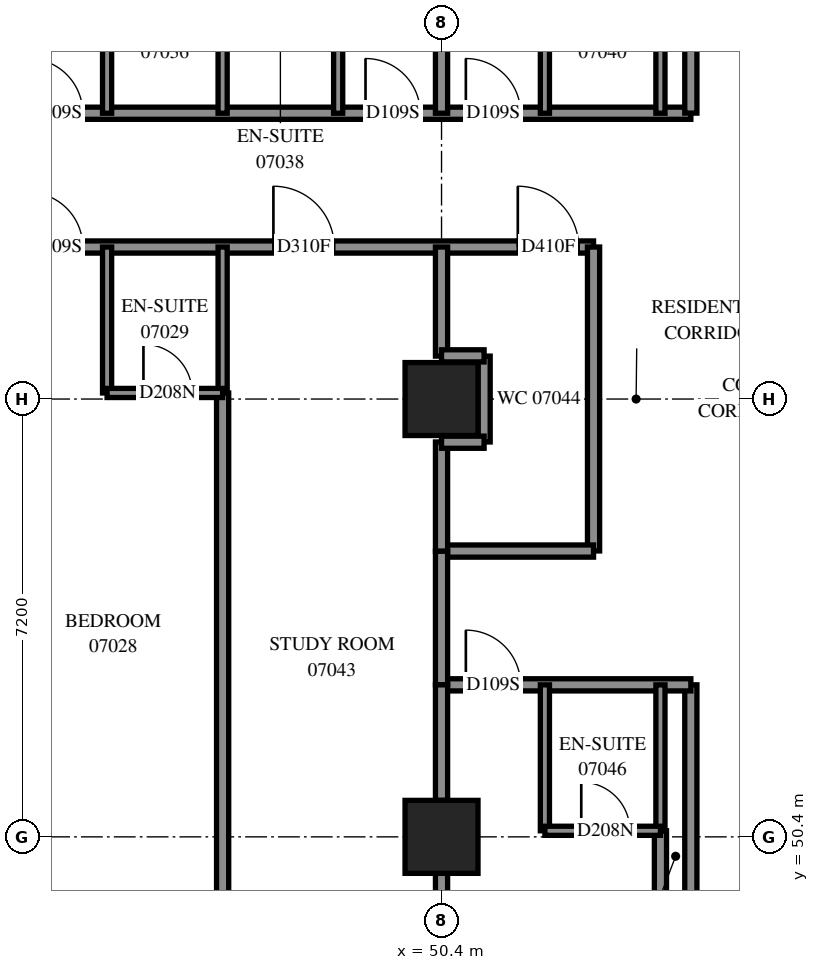
"""IFC4 building model, lengths in metres.
Left out: names, types, materials, properties, quantities, classifications, styles, units other than length and angle.
Written with IfcOpenShell. Run it as: python <this file> out.ifc"""

import sys

from ifc_helpers import new_model, si_unit, direction, frame, frame_2d, origin, origin_2d, place, context, subcontext, project, spatial, rectangle, extrude, element, fill, save


model = new_model("IFC4")
c1 = context("Model", 3, precision=1e-05, world=origin(), true_north=direction((0.0, 1.0)))
c2 = subcontext(c1, "Body", "Model", "MODEL_VIEW")
j1 = project(units=[si_unit("LENGTHUNIT", "METRE"), si_unit("PLANEANGLEUNIT", "RADIAN")], contexts=[c1])
p1 = place(None, origin())
s1 = spatial("IfcSite", under=j1, at=p1, CompositionType="ELEMENT")
p2 = place(p1, origin())
s2 = spatial("IfcBuilding", under=s1, at=p2, CompositionType="ELEMENT")
p3 = place(p2, frame((0.0, 0.0, 30.4)))
s3 = spatial("IfcBuildingStorey", under=s2, at=p3, CompositionType="ELEMENT", Elevation=30.4)
for number, where, z_axis, x_axis in (
    (1, (50.4, 50.4, 0.0), (0.0, 0.0, 1.0), (1.0, 0.0, 0.0)),
    (2, (50.4, 57.6, 0.0), (0.0, 0.0, 1.0), (1.0, 0.0, 0.0)),
):
    element("IfcColumn", number, at=place(p3, frame(where, z_axis=z_axis, x_axis=x_axis)), inside=s3, PredefinedType="COLUMN", context=c2, shape_type="SweptSolid", body=[
        extrude(rectangle(XDim=1.2, YDim=1.2, at=origin_2d()), origin(), (0.0, 0.0, 1.0), 3.1),
    ])
p4 = place(p3, frame((28.8, 60.1, 0.0), z_axis=(0.0, 0.0, 1.0), x_axis=(1.0, 0.0, 0.0)))
e3 = element("IfcWall", 3, at=p4, inside=s3, PredefinedType="PARTITIONING", context=c2, shape_type="SweptSolid", body=[
    extrude(rectangle(XDim=24.1, YDim=0.2, at=frame_2d((12.05, 0.0))), origin(), (0.0, 0.0, 1.0), 3.1),
])
p5 = place(p4, frame((4.125, 0.0, 0.0)))
e4 = element("IfcOpeningElement", 4, at=p5, cuts=e3, PredefinedType="OPENING", context=c2, shape_type="SweptSolid", body=[
    extrude(rectangle(XDim=1.0, YDim=2.1, at=frame_2d((0.5, 1.05))), frame((0.0, 0.11, 0.0), z_axis=(0.0, -1.0, 0.0), x_axis=(1.0, 0.0, 0.0)), (0.0, 0.0, 1.0), 0.22),
])
p6 = place(p4, frame((11.62, 0.0, 0.0)))
e5 = element("IfcOpeningElement", 5, at=p6, cuts=e3, PredefinedType="OPENING", context=c2, shape_type="SweptSolid", body=[
    extrude(rectangle(XDim=0.9, YDim=2.1, at=frame_2d((0.45, 1.05))), frame((0.0, 0.11, 0.0), z_axis=(0.0, -1.0, 0.0), x_axis=(1.0, 0.0, 0.0)), (0.0, 0.0, 1.0), 0.22),
])
p7 = place(p4, frame((14.8, 0.0, 0.0)))
e6 = element("IfcOpeningElement", 6, at=p7, cuts=e3, PredefinedType="OPENING", context=c2, shape_type="SweptSolid", body=[
    extrude(rectangle(XDim=0.9, YDim=2.1, at=frame_2d((0.45, 1.05))), frame((0.0, 0.11, 0.0), z_axis=(0.0, -1.0, 0.0), x_axis=(1.0, 0.0, 0.0)), (0.0, 0.0, 1.0), 0.22),
])
p8 = place(p4, frame((18.835, 0.0, 0.0)))
e7 = element("IfcOpeningElement", 7, at=p8, cuts=e3, PredefinedType="OPENING", context=c2, shape_type="SweptSolid", body=[
    extrude(rectangle(XDim=1.0, YDim=2.1, at=frame_2d((0.5, 1.05))), frame((0.0, 0.11, 0.0), z_axis=(0.0, -1.0, 0.0), x_axis=(1.0, 0.0, 0.0)), (0.0, 0.0, 1.0), 0.22),
])
p9 = place(p4, frame((22.854, 0.0, 0.0)))
e8 = element("IfcOpeningElement", 8, at=p9, cuts=e3, PredefinedType="OPENING", context=c2, shape_type="SweptSolid", body=[
    extrude(rectangle(XDim=1.0, YDim=2.1, at=frame_2d((0.5, 1.05))), frame((0.0, 0.11, 0.0), z_axis=(0.0, -1.0, 0.0), x_axis=(1.0, 0.0, 0.0)), (0.0, 0.0, 1.0), 0.22),
])
p10 = place(p3, frame((33.502, 62.3, 0.0), z_axis=(0.0, 0.0, 1.0), x_axis=(1.0, 0.0, 0.0)))
e9 = element("IfcWall", 9, at=p10, inside=s3, PredefinedType="PARTITIONING", context=c2, shape_type="SweptSolid", body=[
    extrude(rectangle(XDim=20.998, YDim=0.2, at=frame_2d((10.499, 0.0))), origin(), (0.0, 0.0, 1.0), 3.1),
])
p11 = place(p10, frame((2.898, 0.0, 0.0)))
e10 = element("IfcOpeningElement", 10, at=p11, cuts=e9, PredefinedType="OPENING", context=c2, shape_type="SweptSolid", body=[
    extrude(rectangle(XDim=0.9, YDim=2.1, at=frame_2d((0.45, 1.05))), frame((0.0, 0.11, 0.0), z_axis=(0.0, -1.0, 0.0), x_axis=(1.0, 0.0, 0.0)), (0.0, 0.0, 1.0), 0.22),
])
p12 = place(p10, frame((8.448, 0.0, 0.0)))
e11 = element("IfcOpeningElement", 11, at=p12, cuts=e9, PredefinedType="OPENING", context=c2, shape_type="SweptSolid", body=[
    extrude(rectangle(XDim=0.9, YDim=2.1, at=frame_2d((0.45, 1.05))), frame((0.0, 0.11, 0.0), z_axis=(0.0, -1.0, 0.0), x_axis=(1.0, 0.0, 0.0)), (0.0, 0.0, 1.0), 0.22),
])
p13 = place(p10, frame((10.098, 0.0, 0.0)))
e12 = element("IfcOpeningElement", 12, at=p13, cuts=e9, PredefinedType="OPENING", context=c2, shape_type="SweptSolid", body=[
    extrude(rectangle(XDim=0.9, YDim=2.1, at=frame_2d((0.45, 1.05))), frame((0.0, 0.11, 0.0), z_axis=(0.0, -1.0, 0.0), x_axis=(1.0, 0.0, 0.0)), (0.0, 0.0, 1.0), 0.22),
])
p14 = place(p10, frame((15.648, 0.0, 0.0)))
e13 = element("IfcOpeningElement", 13, at=p14, cuts=e9, PredefinedType="OPENING", context=c2, shape_type="SweptSolid", body=[
    extrude(rectangle(XDim=0.9, YDim=2.1, at=frame_2d((0.45, 1.05))), frame((0.0, 0.11, 0.0), z_axis=(0.0, -1.0, 0.0), x_axis=(1.0, 0.0, 0.0)), (0.0, 0.0, 1.0), 0.22),
])
p15 = place(p10, frame((17.298, 0.0, 0.0)))
e14 = element("IfcOpeningElement", 14, at=p15, cuts=e9, PredefinedType="OPENING", context=c2, shape_type="SweptSolid", body=[
    extrude(rectangle(XDim=0.9, YDim=2.1, at=frame_2d((0.45, 1.05))), frame((0.0, 0.11, 0.0), z_axis=(0.0, -1.0, 0.0), x_axis=(1.0, 0.0, 0.0)), (0.0, 0.0, 1.0), 0.22),
])
p16 = place(p3, frame((46.8, 48.82, 0.0), z_axis=(0.0, 0.0, 1.0), x_axis=(0.0, 1.0, 0.0)))
e15 = element("IfcWall", 15, at=p16, inside=s3, PredefinedType="PARTITIONING", context=c2, shape_type="SweptSolid", body=[
    extrude(rectangle(XDim=8.88, YDim=0.2, at=frame_2d((4.44, 0.0))), origin(), (0.0, 0.0, 1.0), 3.1),
])
p17 = place(p3, frame((54.0, 42.42, 0.0), z_axis=(0.0, 0.0, 1.0), x_axis=(0.0, 1.0, 0.0)))
e16 = element("IfcWall", 16, at=p17, inside=s3, PredefinedType="PARTITIONING", context=c2, shape_type="SweptSolid", body=[
    extrude(rectangle(XDim=8.08, YDim=0.2, at=frame_2d((4.04, 0.0))), origin(), (0.0, 0.0, 1.0), 3.1),
])
p18 = place(p3, frame((50.4, 43.8, 0.0), z_axis=(0.0, 0.0, 1.0), x_axis=(0.0, 1.0, 0.0)))
e17 = element("IfcWall", 17, at=p18, inside=s3, PredefinedType="PARTITIONING", context=c2, shape_type="SweptSolid", body=[
    extrude(rectangle(XDim=6.0, YDim=0.2, at=frame_2d((3.0, 0.0))), origin(), (0.0, 0.0, 1.0), 2.6),
])
p19 = place(p3, frame((54.5, 47.3, 0.0), z_axis=(0.0, 0.0, 1.0), x_axis=(0.0, 1.0, 0.0)))
e18 = element("IfcWall", 18, at=p19, inside=s3, PredefinedType="PARTITIONING", context=c2, shape_type="SweptSolid", body=[
    extrude(rectangle(XDim=5.6, YDim=0.2, at=frame_2d((2.8, 0.0))), origin(), (0.0, 0.0, 1.0), 3.1),
])
p20 = place(p3, frame((54.5, 62.302, 0.0), z_axis=(0.0, 0.0, 1.0), x_axis=(0.0, 1.0, 0.0)))
e19 = element("IfcWall", 19, at=p20, inside=s3, PredefinedType="PARTITIONING", context=c2, shape_type="SweptSolid", body=[
    extrude(rectangle(XDim=5.598, YDim=0.2, at=frame_2d((2.799, 0.0))), origin(), (0.0, 0.0, 1.0), 3.1),
])
p21 = place(p3, frame((52.9, 55.102, 0.0), z_axis=(0.0, 0.0, 1.0), x_axis=(0.0, 1.0, 0.0)))
e20 = element("IfcWall", 20, at=p21, inside=s3, PredefinedType="PARTITIONING", context=c2, shape_type="SweptSolid", body=[
    extrude(rectangle(XDim=4.998, YDim=0.2, at=frame_2d((2.499, 0.0))), origin(), (0.0, 0.0, 1.0), 3.1),
])
p22 = place(p3, frame((50.4, 52.9, 0.0), z_axis=(0.0, 0.0, 1.0), x_axis=(1.0, 0.0, 0.0)))
e21 = element("IfcWall", 21, at=p22, inside=s3, PredefinedType="PARTITIONING", context=c2, shape_type="SweptSolid", body=[
    extrude(rectangle(XDim=4.1, YDim=0.2, at=frame_2d((2.05, 0.0))), origin(), (0.0, 0.0, 1.0), 3.1),
])
p23 = place(p22, frame((0.4, 0.0, 0.0)))
e22 = element("IfcOpeningElement", 22, at=p23, cuts=e21, PredefinedType="OPENING", context=c2, shape_type="SweptSolid", body=[
    extrude(rectangle(XDim=0.9, YDim=2.1, at=frame_2d((0.45, 1.05))), frame((0.0, 0.11, 0.0), z_axis=(0.0, -1.0, 0.0), x_axis=(1.0, 0.0, 0.0)), (0.0, 0.0, 1.0), 0.22),
])
p24 = place(p3, frame((50.4, 55.1, 0.0), z_axis=(0.0, 0.0, 1.0), x_axis=(1.0, 0.0, 0.0)))
e23 = element("IfcWall", 23, at=p24, inside=s3, PredefinedType="PARTITIONING", context=c2, shape_type="SweptSolid", body=[
    extrude(rectangle(XDim=2.5, YDim=0.2, at=frame_2d((1.25, 0.0))), origin(), (0.0, 0.0, 1.0), 3.1),
])
for number, where, z_axis, x_axis in (
    (24, (44.9, 62.3, 0.0), (0.0, 0.0, 1.0), (0.0, 1.0, 0.0)),
    (25, (46.8, 62.3, 0.0), (0.0, 0.0, 1.0), (0.0, 1.0, 0.0)),
    (26, (48.7, 62.3, 0.0), (0.0, 0.0, 1.0), (0.0, 1.0, 0.0)),
    (27, (52.1, 62.3, 0.0), (0.0, 0.0, 1.0), (0.0, 1.0, 0.0)),
    (28, (54.0, 62.3, 0.0), (0.0, 0.0, 1.0), (0.0, 1.0, 0.0)),
    (29, (44.9, 57.7, 0.0), (0.0, 0.0, 1.0), (0.0, 1.0, 0.0)),
    (30, (46.8, 57.7, 0.0), (0.0, 0.0, 1.0), (0.0, 1.0, 0.0)),
    (31, (52.1, 50.5, 0.0), (0.0, 0.0, 1.0), (0.0, 1.0, 0.0)),
    (32, (54.0, 50.5, 0.0), (0.0, 0.0, 1.0), (0.0, 1.0, 0.0)),
):
    element("IfcWall", number, at=place(p3, frame(where, z_axis=z_axis, x_axis=x_axis)), inside=s3, PredefinedType="PARTITIONING", context=c2, shape_type="SweptSolid", body=[
        extrude(rectangle(XDim=2.4, YDim=0.15, at=frame_2d((1.2, 0.0))), origin(), (0.0, 0.0, 1.0), 3.1),
    ])
p25 = place(p3, frame((50.4, 52.9, 0.0), z_axis=(0.0, 0.0, 1.0), x_axis=(0.0, 1.0, 0.0)))
e33 = element("IfcWall", 33, at=p25, inside=s3, PredefinedType="PARTITIONING", context=c2, shape_type="SweptSolid", body=[
    extrude(rectangle(XDim=2.2, YDim=0.2, at=frame_2d((1.1, 0.0))), origin(), (0.0, 0.0, 1.0), 3.1),
])
p26 = place(p3, frame((50.4, 62.3, 0.0), z_axis=(0.0, 0.0, 1.0), x_axis=(0.0, 1.0, 0.0)))
e34 = element("IfcWall", 34, at=p26, inside=s3, PredefinedType="PARTITIONING", context=c2, shape_type="SweptSolid", body=[
    extrude(rectangle(XDim=1.9, YDim=0.2, at=frame_2d((0.95, 0.0))), origin(), (0.0, 0.0, 1.0), 3.1),
])
p27 = place(p3, frame((44.9, 57.7, 0.0), z_axis=(0.0, 0.0, 1.0), x_axis=(1.0, 0.0, 0.0)))
e35 = element("IfcWall", 35, at=p27, inside=s3, PredefinedType="PARTITIONING", context=c2, shape_type="SweptSolid", body=[
    extrude(rectangle(XDim=1.9, YDim=0.15, at=frame_2d((0.95, 0.0))), origin(), (0.0, 0.0, 1.0), 3.1),
])
p28 = place(p27, frame((0.598, 0.0, 0.0)))
e36 = element("IfcOpeningElement", 36, at=p28, cuts=e35, PredefinedType="OPENING", context=c2, shape_type="SweptSolid", body=[
    extrude(rectangle(XDim=0.8, YDim=2.1, at=frame_2d((0.4, 1.05))), frame((0.0, 0.085, 0.0), z_axis=(0.0, -1.0, 0.0), x_axis=(1.0, 0.0, 0.0)), (0.0, 0.0, 1.0), 0.17),
])
p29 = place(p3, frame((50.4, 51.0, 0.0), z_axis=(0.0, 0.0, 1.0), x_axis=(0.0, 1.0, 0.0)))
e37 = element("IfcWall", 37, at=p29, inside=s3, PredefinedType="PARTITIONING", context=c2, shape_type="SweptSolid", body=[
    extrude(rectangle(XDim=1.9, YDim=0.2, at=frame_2d((0.95, 0.0))), origin(), (0.0, 0.0, 1.0), 3.1),
])
p30 = place(p3, frame((52.1, 50.5, 0.0), z_axis=(0.0, 0.0, 1.0), x_axis=(1.0, 0.0, 0.0)))
e38 = element("IfcWall", 38, at=p30, inside=s3, PredefinedType="PARTITIONING", context=c2, shape_type="SweptSolid", body=[
    extrude(rectangle(XDim=1.9, YDim=0.15, at=frame_2d((0.95, 0.0))), origin(), (0.0, 0.0, 1.0), 3.1),
])
p31 = place(p30, frame((0.598, 0.0, 0.0)))
e39 = element("IfcOpeningElement", 39, at=p31, cuts=e38, PredefinedType="OPENING", context=c2, shape_type="SweptSolid", body=[
    extrude(rectangle(XDim=0.8, YDim=2.1, at=frame_2d((0.4, 1.05))), frame((0.0, 0.085, 0.0), z_axis=(0.0, -1.0, 0.0), x_axis=(1.0, 0.0, 0.0)), (0.0, 0.0, 1.0), 0.17),
])
for number, where, z_axis, x_axis in (
    (40, (50.4, 58.306, 0.0), (0.0, 0.0, 1.0), (0.0, 1.0, 0.0)),
    (41, (50.4, 55.1, 0.0), (0.0, 0.0, 1.0), (0.0, 1.0, 0.0)),
):
    element("IfcWall", number, at=place(p3, frame(where, z_axis=z_axis, x_axis=x_axis)), inside=s3, PredefinedType="PARTITIONING", context=c2, shape_type="SweptSolid", body=[
        extrude(rectangle(XDim=1.794, YDim=0.2, at=frame_2d((0.897, 0.0))), origin(), (0.0, 0.0, 1.0), 3.1),
    ])
p32 = place(p3, frame((51.1, 56.894, 0.0), z_axis=(0.0, 0.0, 1.0), x_axis=(0.0, 1.0, 0.0)))
e42 = element("IfcWall", 42, at=p32, inside=s3, PredefinedType="PARTITIONING", context=c2, shape_type="SweptSolid", body=[
    extrude(rectangle(XDim=1.412, YDim=0.2, at=frame_2d((0.706, 0.0))), origin(), (0.0, 0.0, 1.0), 3.1),
])
for number, where, z_axis, x_axis in (
    (43, (50.4, 58.31, 0.0), (0.0, 0.0, 1.0), (1.0, 0.0, 0.0)),
    (44, (50.4, 56.89, 0.0), (0.0, 0.0, 1.0), (1.0, 0.0, 0.0)),
):
    element("IfcWall", number, at=place(p3, frame(where, z_axis=z_axis, x_axis=x_axis)), inside=s3, PredefinedType="PARTITIONING", context=c2, shape_type="SweptSolid", body=[
        extrude(rectangle(XDim=0.7, YDim=0.2, at=frame_2d((0.35, 0.0))), origin(), (0.0, 0.0, 1.0), 3.1),
    ])
p33 = place(p7, origin())
e45 = element("IfcDoor", 45, at=p33, inside=s3, OperationType="SINGLE_SWING_LEFT", PredefinedType="DOOR", context=c2, shape_type="SweptSolid", body=[
    extrude(rectangle(XDim=0.9, YDim=2.1, at=frame_2d((0.45, 1.05))), frame((0.0, 0.025, 0.0), z_axis=(0.0, -1.0, 0.0), x_axis=(1.0, 0.0, 0.0)), (0.0, 0.0, 1.0), 0.05),
])
fill(e6, e45)
p34 = place(p28, origin())
e46 = element("IfcDoor", 46, at=p34, inside=s3, OperationType="SINGLE_SWING_RIGHT", PredefinedType="DOOR", context=c2, shape_type="SweptSolid", body=[
    extrude(rectangle(XDim=0.8, YDim=2.1, at=frame_2d((0.4, 1.05))), frame((0.0, 0.025, 0.0), z_axis=(0.0, -1.0, 0.0), x_axis=(1.0, 0.0, 0.0)), (0.0, 0.0, 1.0), 0.05),
])
fill(e36, e46)
p35 = place(p13, origin())
e47 = element("IfcDoor", 47, at=p35, inside=s3, OperationType="SINGLE_SWING_RIGHT", PredefinedType="DOOR", context=c2, shape_type="SweptSolid", body=[
    extrude(rectangle(XDim=0.9, YDim=2.1, at=frame_2d((0.45, 1.05))), frame((0.0, 0.025, 0.0), z_axis=(0.0, -1.0, 0.0), x_axis=(1.0, 0.0, 0.0)), (0.0, 0.0, 1.0), 0.05),
])
fill(e12, e47)
p36 = place(p14, origin())
e48 = element("IfcDoor", 48, at=p36, inside=s3, OperationType="SINGLE_SWING_LEFT", PredefinedType="DOOR", context=c2, shape_type="SweptSolid", body=[
    extrude(rectangle(XDim=0.9, YDim=2.1, at=frame_2d((0.45, 1.05))), frame((0.0, 0.025, 0.0), z_axis=(0.0, -1.0, 0.0), x_axis=(1.0, 0.0, 0.0)), (0.0, 0.0, 1.0), 0.05),
])
fill(e13, e48)
p37 = place(p15, origin())
e49 = element("IfcDoor", 49, at=p37, inside=s3, OperationType="SINGLE_SWING_RIGHT", PredefinedType="DOOR", context=c2, shape_type="SweptSolid", body=[
    extrude(rectangle(XDim=0.9, YDim=2.1, at=frame_2d((0.45, 1.05))), frame((0.0, 0.025, 0.0), z_axis=(0.0, -1.0, 0.0), x_axis=(1.0, 0.0, 0.0)), (0.0, 0.0, 1.0), 0.05),
])
fill(e14, e49)
p38 = place(p8, origin())
e50 = element("IfcDoor", 50, at=p38, inside=s3, OperationType="SINGLE_SWING_RIGHT", PredefinedType="DOOR", context=c2, shape_type="SweptSolid", body=[
    extrude(rectangle(XDim=1.0, YDim=2.1, at=frame_2d((0.5, 1.05))), frame((0.0, 0.025, 0.0), z_axis=(0.0, -1.0, 0.0), x_axis=(1.0, 0.0, 0.0)), (0.0, 0.0, 1.0), 0.05),
])
fill(e7, e50)
p39 = place(p9, origin())
e51 = element("IfcDoor", 51, at=p39, inside=s3, OperationType="SINGLE_SWING_LEFT", PredefinedType="DOOR", context=c2, shape_type="SweptSolid", body=[
    extrude(rectangle(XDim=1.0, YDim=2.1, at=frame_2d((0.5, 1.05))), frame((0.0, 0.025, 0.0), z_axis=(0.0, -1.0, 0.0), x_axis=(1.0, 0.0, 0.0)), (0.0, 0.0, 1.0), 0.05),
])
fill(e8, e51)
p40 = place(p23, origin())
e52 = element("IfcDoor", 52, at=p40, inside=s3, OperationType="SINGLE_SWING_LEFT", PredefinedType="DOOR", context=c2, shape_type="SweptSolid", body=[
    extrude(rectangle(XDim=0.9, YDim=2.1, at=frame_2d((0.45, 1.05))), frame((0.0, 0.025, 0.0), z_axis=(0.0, -1.0, 0.0), x_axis=(1.0, 0.0, 0.0)), (0.0, 0.0, 1.0), 0.05),
])
fill(e22, e52)
p41 = place(p31, origin())
e53 = element("IfcDoor", 53, at=p41, inside=s3, OperationType="SINGLE_SWING_RIGHT", PredefinedType="DOOR", context=c2, shape_type="SweptSolid", body=[
    extrude(rectangle(XDim=0.8, YDim=2.1, at=frame_2d((0.4, 1.05))), frame((0.0, 0.025, 0.0), z_axis=(0.0, -1.0, 0.0), x_axis=(1.0, 0.0, 0.0)), (0.0, 0.0, 1.0), 0.05),
])
fill(e39, e53)
save(model, sys.argv[1])
